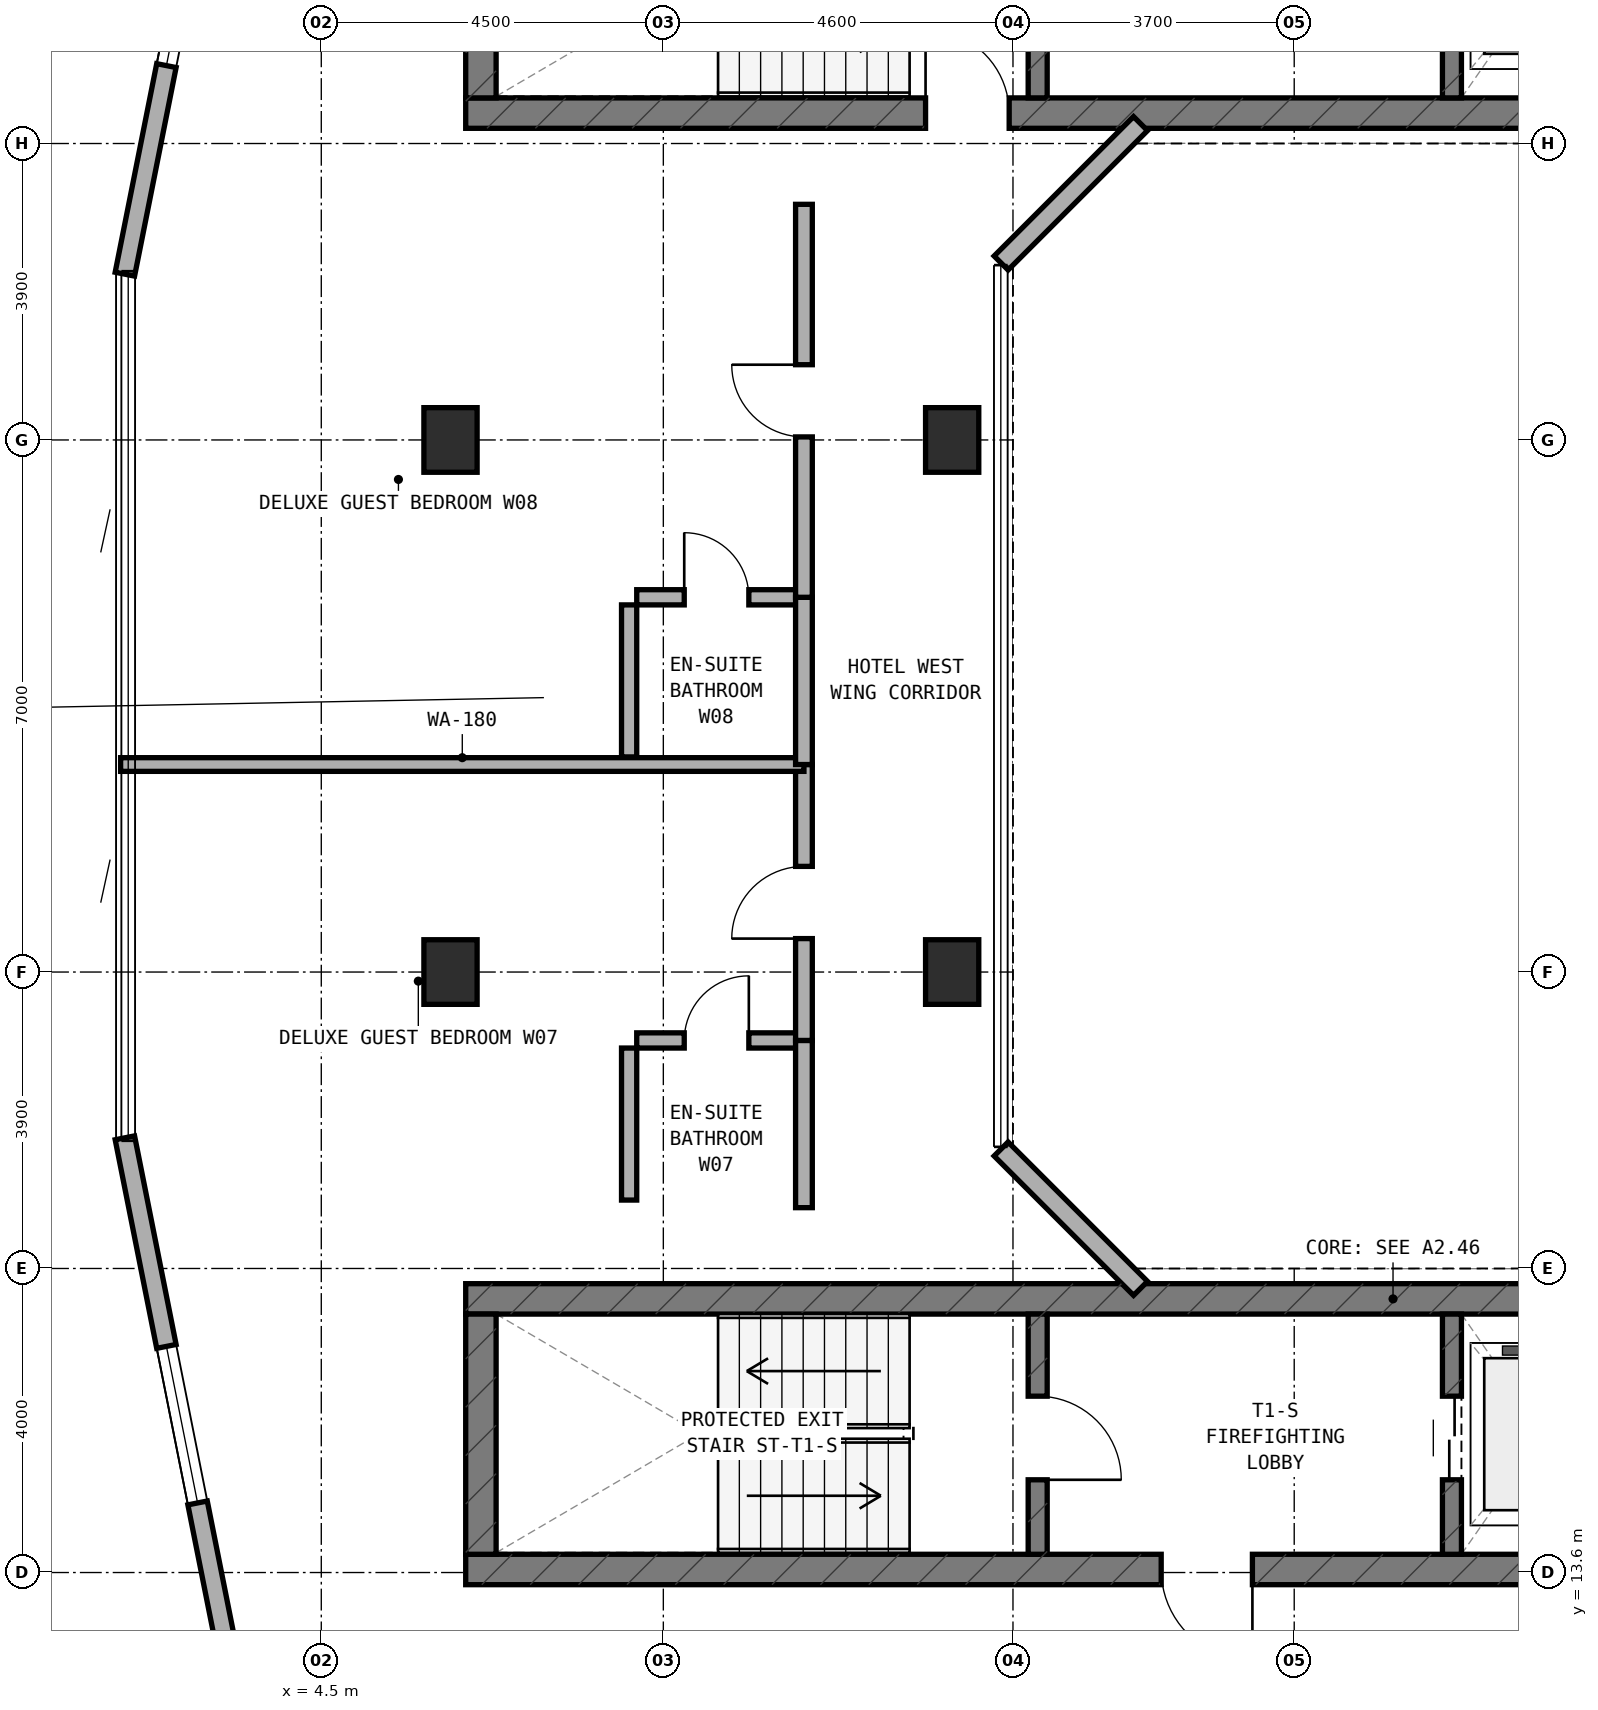
"""IFC4 building model, lengths in metres.
Left out: names, types, materials, properties, quantities, classifications, styles, units other than length and angle.
Written with IfcOpenShell. Run it as: python <this file> out.ifc"""

import sys

from ifc_helpers import new_model, si_unit, direction, frame, frame_2d, origin, origin_2d, place, context, subcontext, project, spatial, rectangle, extrude, element, fill, save


model = new_model("IFC4")
c1 = context("Model", 3, precision=1e-05, world=origin(), true_north=direction((0.0, 1.0)))
c2 = subcontext(c1, "Body", "Model", "MODEL_VIEW")
j1 = project(units=[si_unit("LENGTHUNIT", "METRE"), si_unit("PLANEANGLEUNIT", "RADIAN")], contexts=[c1])
p1 = place(None, origin())
s1 = spatial("IfcSite", under=j1, at=p1, CompositionType="ELEMENT")
p2 = place(p1, origin())
s2 = spatial("IfcBuilding", under=s1, at=p2, CompositionType="ELEMENT")
p3 = place(p2, frame((0.0, 0.0, 217.1)))
s3 = spatial("IfcBuildingStorey", under=s2, at=p3, CompositionType="ELEMENT", Elevation=217.1)
p4 = place(p3, frame((6.4, 32.8, 0.0), z_axis=(0.0, 0.0, 1.0), x_axis=(1.0, 0.0, 0.0)))
e1 = element("IfcWall", 1, at=p4, inside=s3, PredefinedType="SHEAR", context=c2, shape_type="SweptSolid", body=[
    extrude(rectangle(XDim=24.4, YDim=0.4, at=frame_2d((12.2, 0.0))), origin(), (0.0, 0.0, 1.0), 3.6),
])
p5 = place(p4, frame((6.05, 0.0, 0.0)))
e2 = element("IfcOpeningElement", 2, at=p5, cuts=e1, PredefinedType="OPENING", context=c2, shape_type="SweptSolid", body=[
    extrude(rectangle(XDim=1.1, YDim=2.15, at=frame_2d((0.55, 1.075))), frame((0.0, 0.21, 0.0), z_axis=(0.0, -1.0, 0.0), x_axis=(1.0, 0.0, 0.0)), (0.0, 0.0, 1.0), 0.42),
])
p6 = place(p3, frame((6.6, 33.0, 0.0), z_axis=(0.0, 0.0, 1.0), x_axis=(0.0, 1.0, 0.0)))
e3 = element("IfcWall", 3, at=p6, inside=s3, PredefinedType="SHEAR", context=c2, shape_type="SweptSolid", body=[
    extrude(rectangle(XDim=3.16, YDim=0.4, at=frame_2d((1.58, 0.0))), origin(), (0.0, 0.0, 1.0), 3.6),
])
p7 = place(p3, frame((13.925, 33.0, 0.0), z_axis=(0.0, 0.0, 1.0), x_axis=(0.0, 1.0, 0.0)))
e4 = element("IfcWall", 4, at=p7, inside=s3, PredefinedType="STANDARD", context=c2, shape_type="SweptSolid", body=[
    extrude(rectangle(XDim=3.16, YDim=0.25, at=frame_2d((1.58, 0.0))), origin(), (0.0, 0.0, 1.0), 3.32),
])
p8 = place(p7, frame((0.98, 0.0, 0.0)))
e5 = element("IfcOpeningElement", 5, at=p8, cuts=e4, PredefinedType="OPENING", context=c2, shape_type="SweptSolid", body=[
    extrude(rectangle(XDim=1.1, YDim=2.15, at=frame_2d((0.55, 1.075))), frame((0.0, 0.135, 0.0), z_axis=(0.0, -1.0, 0.0), x_axis=(1.0, 0.0, 0.0)), (0.0, 0.0, 1.0), 0.27),
])
p9 = place(p3, frame((19.375, 33.0, 0.0), z_axis=(0.0, 0.0, 1.0), x_axis=(0.0, 1.0, 0.0)))
e6 = element("IfcWall", 6, at=p9, inside=s3, PredefinedType="STANDARD", context=c2, shape_type="SweptSolid", body=[
    extrude(rectangle(XDim=3.16, YDim=0.25, at=frame_2d((1.58, 0.0))), origin(), (0.0, 0.0, 1.0), 3.32),
])
p10 = place(p9, frame((0.98, 0.0, 0.0)))
e7 = element("IfcOpeningElement", 7, at=p10, cuts=e6, PredefinedType="OPENING", context=c2, shape_type="SweptSolid", body=[
    extrude(rectangle(XDim=1.1, YDim=2.15, at=frame_2d((0.55, 1.075))), frame((0.0, 0.135, 0.0), z_axis=(0.0, -1.0, 0.0), x_axis=(1.0, 0.0, 0.0)), (0.0, 0.0, 1.0), 0.27),
])
p11 = place(p3, frame((6.4, 13.64, 0.0), z_axis=(0.0, 0.0, 1.0), x_axis=(1.0, 0.0, 0.0)))
e8 = element("IfcWall", 8, at=p11, inside=s3, PredefinedType="SHEAR", context=c2, shape_type="SweptSolid", body=[
    extrude(rectangle(XDim=24.4, YDim=0.4, at=frame_2d((12.2, 0.0))), origin(), (0.0, 0.0, 1.0), 3.6),
])
p12 = place(p11, frame((9.15, 0.0, 0.0)))
e9 = element("IfcOpeningElement", 9, at=p12, cuts=e8, PredefinedType="OPENING", context=c2, shape_type="SweptSolid", body=[
    extrude(rectangle(XDim=1.2, YDim=2.15, at=frame_2d((0.6, 1.075))), frame((0.0, 0.21, 0.0), z_axis=(0.0, -1.0, 0.0), x_axis=(1.0, 0.0, 0.0)), (0.0, 0.0, 1.0), 0.42),
])
p13 = place(p11, frame((16.94, 0.0, 0.0)))
e10 = element("IfcOpeningElement", 10, at=p13, cuts=e8, PredefinedType="OPENING", context=c2, shape_type="SweptSolid", body=[
    extrude(rectangle(XDim=0.85, YDim=2.1, at=frame_2d((0.425, 1.05))), frame((0.0, 0.21, 0.0), z_axis=(0.0, -1.0, 0.0), x_axis=(1.0, 0.0, 0.0)), (0.0, 0.0, 1.0), 0.42),
])
p14 = place(p11, frame((18.783, 0.0, 0.0)))
e11 = element("IfcOpeningElement", 11, at=p14, cuts=e8, PredefinedType="OPENING", context=c2, shape_type="SweptSolid", body=[
    extrude(rectangle(XDim=1.1, YDim=2.15, at=frame_2d((0.55, 1.075))), frame((0.0, 0.21, 0.0), z_axis=(0.0, -1.0, 0.0), x_axis=(1.0, 0.0, 0.0)), (0.0, 0.0, 1.0), 0.42),
])
p15 = place(p11, frame((20.65, 0.0, 0.0)))
e12 = element("IfcOpeningElement", 12, at=p15, cuts=e8, PredefinedType="OPENING", context=c2, shape_type="SweptSolid", body=[
    extrude(rectangle(XDim=1.1, YDim=2.15, at=frame_2d((0.55, 1.075))), frame((0.0, 0.21, 0.0), z_axis=(0.0, -1.0, 0.0), x_axis=(1.0, 0.0, 0.0)), (0.0, 0.0, 1.0), 0.42),
])
p16 = place(p11, frame((22.517, 0.0, 0.0)))
e13 = element("IfcOpeningElement", 13, at=p16, cuts=e8, PredefinedType="OPENING", context=c2, shape_type="SweptSolid", body=[
    extrude(rectangle(XDim=1.1, YDim=2.15, at=frame_2d((0.55, 1.075))), frame((0.0, 0.21, 0.0), z_axis=(0.0, -1.0, 0.0), x_axis=(1.0, 0.0, 0.0)), (0.0, 0.0, 1.0), 0.42),
])
p17 = place(p3, frame((6.4, 17.2, 0.0), z_axis=(0.0, 0.0, 1.0), x_axis=(1.0, 0.0, 0.0)))
e14 = element("IfcWall", 14, at=p17, inside=s3, PredefinedType="SHEAR", context=c2, shape_type="SweptSolid", body=[
    extrude(rectangle(XDim=24.4, YDim=0.4, at=frame_2d((12.2, 0.0))), origin(), (0.0, 0.0, 1.0), 3.6),
])
p18 = place(p3, frame((6.6, 13.84, 0.0), z_axis=(0.0, 0.0, 1.0), x_axis=(0.0, 1.0, 0.0)))
e15 = element("IfcWall", 15, at=p18, inside=s3, PredefinedType="SHEAR", context=c2, shape_type="SweptSolid", body=[
    extrude(rectangle(XDim=3.16, YDim=0.4, at=frame_2d((1.58, 0.0))), origin(), (0.0, 0.0, 1.0), 3.6),
])
p19 = place(p3, frame((13.925, 13.84, 0.0), z_axis=(0.0, 0.0, 1.0), x_axis=(0.0, 1.0, 0.0)))
e16 = element("IfcWall", 16, at=p19, inside=s3, PredefinedType="STANDARD", context=c2, shape_type="SweptSolid", body=[
    extrude(rectangle(XDim=3.16, YDim=0.25, at=frame_2d((1.58, 0.0))), origin(), (0.0, 0.0, 1.0), 3.32),
])
p20 = place(p19, frame((0.98, 0.0, 0.0)))
e17 = element("IfcOpeningElement", 17, at=p20, cuts=e16, PredefinedType="OPENING", context=c2, shape_type="SweptSolid", body=[
    extrude(rectangle(XDim=1.1, YDim=2.15, at=frame_2d((0.55, 1.075))), frame((0.0, 0.135, 0.0), z_axis=(0.0, -1.0, 0.0), x_axis=(1.0, 0.0, 0.0)), (0.0, 0.0, 1.0), 0.27),
])
p21 = place(p3, frame((19.375, 13.84, 0.0), z_axis=(0.0, 0.0, 1.0), x_axis=(0.0, 1.0, 0.0)))
e18 = element("IfcWall", 18, at=p21, inside=s3, PredefinedType="STANDARD", context=c2, shape_type="SweptSolid", body=[
    extrude(rectangle(XDim=3.16, YDim=0.25, at=frame_2d((1.58, 0.0))), origin(), (0.0, 0.0, 1.0), 3.32),
])
p22 = place(p21, frame((0.98, 0.0, 0.0)))
e19 = element("IfcOpeningElement", 19, at=p22, cuts=e18, PredefinedType="OPENING", context=c2, shape_type="SweptSolid", body=[
    extrude(rectangle(XDim=1.1, YDim=2.15, at=frame_2d((0.55, 1.075))), frame((0.0, 0.135, 0.0), z_axis=(0.0, -1.0, 0.0), x_axis=(1.0, 0.0, 0.0)), (0.0, 0.0, 1.0), 0.27),
])
for number, where, z_axis, x_axis in (
    (20, (6.2, 21.5, 0.0), (0.0, 0.0, 1.0), (1.0, 0.0, 0.0)),
    (21, (6.2, 28.5, 0.0), (0.0, 0.0, 1.0), (1.0, 0.0, 0.0)),
    (22, (12.8, 21.5, 0.0), (0.0, 0.0, 1.0), (1.0, 0.0, 0.0)),
    (23, (12.8, 28.5, 0.0), (0.0, 0.0, 1.0), (1.0, 0.0, 0.0)),
):
    element("IfcColumn", number, at=place(p3, frame(where, z_axis=z_axis, x_axis=x_axis)), inside=s3, PredefinedType="COLUMN", context=c2, shape_type="SweptSolid", body=[
        extrude(rectangle(XDim=0.7, YDim=0.85, at=origin_2d()), origin(), (0.0, 0.0, 1.0), 3.6),
    ])
p23 = place(p3, frame((3.629, 39.283, 0.0), z_axis=(0.0, 0.0, 1.0), x_axis=(-0.195291715883, -0.980745199176, 0.0)))
e24 = element("IfcWall", 24, at=p23, inside=s3, PredefinedType="STANDARD", context=c2, shape_type="SweptSolid", body=[
    extrude(rectangle(XDim=8.771, YDim=0.26, at=frame_2d((4.385, 0.0))), origin(), (0.0, 0.0, 1.0), 3.32),
])
p24 = place(p23, frame((3.873, 0.0, 0.85)))
e25 = element("IfcOpeningElement", 25, at=p24, cuts=e24, PredefinedType="OPENING", context=c2, shape_type="SweptSolid", body=[
    extrude(rectangle(XDim=2.1, YDim=1.5, at=frame_2d((1.05, 0.75))), frame((0.0, 0.14, 0.0), z_axis=(0.0, -1.0, 0.0), x_axis=(1.0, 0.0, 0.0)), (0.0, 0.0, 1.0), 0.28),
])
p25 = place(p3, frame((1.916, 19.319, 0.0), z_axis=(0.0, 0.0, 1.0), x_axis=(0.195291715883, -0.980745199176, 0.0)))
e26 = element("IfcWall", 26, at=p25, inside=s3, PredefinedType="STANDARD", context=c2, shape_type="SweptSolid", body=[
    extrude(rectangle(XDim=8.771, YDim=0.26, at=frame_2d((4.385, 0.0))), origin(), (0.0, 0.0, 1.0), 3.32),
])
p26 = place(p25, frame((2.798, 0.0, 0.85)))
e27 = element("IfcOpeningElement", 27, at=p26, cuts=e26, PredefinedType="OPENING", context=c2, shape_type="SweptSolid", body=[
    extrude(rectangle(XDim=2.1, YDim=1.5, at=frame_2d((1.05, 0.75))), frame((0.0, 0.14, 0.0), z_axis=(0.0, -1.0, 0.0), x_axis=(1.0, 0.0, 0.0)), (0.0, 0.0, 1.0), 0.28),
])
for number, where, z_axis, x_axis in (
    (28, (15.278, 32.662, 0.0), (0.0, 0.0, 1.0), (-0.707, -0.707, 0.0)),
    (29, (13.444, 19.172, 0.0), (0.0, 0.0, 1.0), (0.707, -0.707, 0.0)),
):
    element("IfcWall", number, at=place(p3, frame(where, z_axis=z_axis, x_axis=x_axis)), inside=s3, PredefinedType="STANDARD", context=c2, shape_type="SweptSolid", body=[
        extrude(rectangle(XDim=2.594, YDim=0.26, at=frame_2d((1.297, 0.0))), origin(), (0.0, 0.0, 1.0), 3.32),
    ])
p27 = place(p3, frame((8.65, 20.6, 0.0), z_axis=(0.0, 0.0, 1.0), x_axis=(1.0, 0.0, 0.0)))
e30 = element("IfcWall", 30, at=p27, inside=s3, PredefinedType="PLUMBINGWALL", context=c2, shape_type="SweptSolid", body=[
    extrude(rectangle(XDim=2.1, YDim=0.2, at=frame_2d((1.05, 0.0))), origin(), (0.0, 0.0, 1.0), 3.32),
])
p28 = place(p27, frame((0.625, 0.0, 0.0)))
e31 = element("IfcOpeningElement", 31, at=p28, cuts=e30, PredefinedType="OPENING", context=c2, shape_type="SweptSolid", body=[
    extrude(rectangle(XDim=0.85, YDim=2.1, at=frame_2d((0.425, 1.05))), frame((0.0, 0.11, 0.0), z_axis=(0.0, -1.0, 0.0), x_axis=(1.0, 0.0, 0.0)), (0.0, 0.0, 1.0), 0.22),
])
p29 = place(p3, frame((8.55, 18.5, 0.0), z_axis=(0.0, 0.0, 1.0), x_axis=(0.0, 1.0, 0.0)))
e32 = element("IfcWall", 32, at=p29, inside=s3, PredefinedType="PLUMBINGWALL", context=c2, shape_type="SweptSolid", body=[
    extrude(rectangle(XDim=2.0, YDim=0.2, at=frame_2d((1.0, 0.0))), origin(), (0.0, 0.0, 1.0), 3.32),
])
p30 = place(p3, frame((10.85, 18.4, 0.0), z_axis=(0.0, 0.0, 1.0), x_axis=(0.0, 1.0, 0.0)))
e33 = element("IfcWall", 33, at=p30, inside=s3, PredefinedType="SOLIDWALL", context=c2, shape_type="SweptSolid", body=[
    extrude(rectangle(XDim=2.2, YDim=0.22, at=frame_2d((1.1, 0.0))), origin(), (0.0, 0.0, 1.0), 3.32),
])
p31 = place(p3, frame((10.85, 20.6, 0.0), z_axis=(0.0, 0.0, 1.0), x_axis=(0.0, 1.0, 0.0)))
e34 = element("IfcWall", 34, at=p31, inside=s3, PredefinedType="SOLIDWALL", context=c2, shape_type="SweptSolid", body=[
    extrude(rectangle(XDim=3.63, YDim=0.22, at=frame_2d((1.815, 0.0))), origin(), (0.0, 0.0, 1.0), 2.695),
])
p32 = place(p31, frame((1.34, 0.0, 0.0)))
e35 = element("IfcOpeningElement", 35, at=p32, cuts=e34, PredefinedType="OPENING", context=c2, shape_type="SweptSolid", body=[
    extrude(rectangle(XDim=0.95, YDim=2.1, at=frame_2d((0.475, 1.05))), frame((0.0, 0.12, 0.0), z_axis=(0.0, -1.0, 0.0), x_axis=(1.0, 0.0, 0.0)), (0.0, 0.0, 1.0), 0.24),
])
p33 = place(p3, frame((1.86, 24.23, 0.0), z_axis=(0.0, 0.0, 1.0), x_axis=(1.0, 0.0, 0.0)))
e36 = element("IfcWall", 36, at=p33, inside=s3, PredefinedType="SOLIDWALL", context=c2, shape_type="SweptSolid", body=[
    extrude(rectangle(XDim=8.99, YDim=0.18, at=frame_2d((4.495, 0.0))), origin(), (0.0, 0.0, 1.0), 3.015),
])
p34 = place(p3, frame((8.65, 26.43, 0.0), z_axis=(0.0, 0.0, 1.0), x_axis=(1.0, 0.0, 0.0)))
e37 = element("IfcWall", 37, at=p34, inside=s3, PredefinedType="PLUMBINGWALL", context=c2, shape_type="SweptSolid", body=[
    extrude(rectangle(XDim=2.1, YDim=0.2, at=frame_2d((1.05, 0.0))), origin(), (0.0, 0.0, 1.0), 3.32),
])
p35 = place(p34, frame((0.625, 0.0, 0.0)))
e38 = element("IfcOpeningElement", 38, at=p35, cuts=e37, PredefinedType="OPENING", context=c2, shape_type="SweptSolid", body=[
    extrude(rectangle(XDim=0.85, YDim=2.1, at=frame_2d((0.425, 1.05))), frame((0.0, 0.11, 0.0), z_axis=(0.0, -1.0, 0.0), x_axis=(1.0, 0.0, 0.0)), (0.0, 0.0, 1.0), 0.22),
])
p36 = place(p3, frame((8.55, 24.33, 0.0), z_axis=(0.0, 0.0, 1.0), x_axis=(0.0, 1.0, 0.0)))
e39 = element("IfcWall", 39, at=p36, inside=s3, PredefinedType="PLUMBINGWALL", context=c2, shape_type="SweptSolid", body=[
    extrude(rectangle(XDim=2.0, YDim=0.2, at=frame_2d((1.0, 0.0))), origin(), (0.0, 0.0, 1.0), 3.32),
])
p37 = place(p3, frame((10.85, 24.23, 0.0), z_axis=(0.0, 0.0, 1.0), x_axis=(0.0, 1.0, 0.0)))
e40 = element("IfcWall", 40, at=p37, inside=s3, PredefinedType="SOLIDWALL", context=c2, shape_type="SweptSolid", body=[
    extrude(rectangle(XDim=2.2, YDim=0.22, at=frame_2d((1.1, 0.0))), origin(), (0.0, 0.0, 1.0), 3.32),
])
p38 = place(p3, frame((10.85, 26.43, 0.0), z_axis=(0.0, 0.0, 1.0), x_axis=(0.0, 1.0, 0.0)))
e41 = element("IfcWall", 41, at=p38, inside=s3, PredefinedType="SOLIDWALL", context=c2, shape_type="SweptSolid", body=[
    extrude(rectangle(XDim=5.17, YDim=0.22, at=frame_2d((2.585, 0.0))), origin(), (0.0, 0.0, 1.0), 2.695),
])
p39 = place(p38, frame((2.11, 0.0, 0.0)))
e42 = element("IfcOpeningElement", 42, at=p39, cuts=e41, PredefinedType="OPENING", context=c2, shape_type="SweptSolid", body=[
    extrude(rectangle(XDim=0.95, YDim=2.1, at=frame_2d((0.475, 1.05))), frame((0.0, 0.12, 0.0), z_axis=(0.0, -1.0, 0.0), x_axis=(1.0, 0.0, 0.0)), (0.0, 0.0, 1.0), 0.24),
])
p40 = place(p24, origin())
e43 = element("IfcWindow", 43, at=p40, inside=s3, PartitioningType="SINGLE_PANEL", PredefinedType="WINDOW", context=c2, shape_type="SweptSolid", body=[
    extrude(rectangle(XDim=2.1, YDim=1.5, at=frame_2d((1.05, 0.75))), frame((0.0, 0.03, 0.0), z_axis=(0.0, -1.0, 0.0), x_axis=(1.0, 0.0, 0.0)), (0.0, 0.0, 1.0), 0.06),
])
fill(e25, e43)
p41 = place(p26, origin())
e44 = element("IfcWindow", 44, at=p41, inside=s3, PartitioningType="SINGLE_PANEL", PredefinedType="WINDOW", context=c2, shape_type="SweptSolid", body=[
    extrude(rectangle(XDim=2.1, YDim=1.5, at=frame_2d((1.05, 0.75))), frame((0.0, 0.03, 0.0), z_axis=(0.0, -1.0, 0.0), x_axis=(1.0, 0.0, 0.0)), (0.0, 0.0, 1.0), 0.06),
])
fill(e27, e44)
p42 = place(p20, frame((1.1, 0.0, 0.0), z_axis=(0.0, 0.0, 1.0), x_axis=(-1.0, 0.0, 0.0)))
e45 = element("IfcDoor", 45, at=p42, inside=s3, OperationType="SINGLE_SWING_RIGHT", PredefinedType="DOOR", context=c2, shape_type="SweptSolid", body=[
    extrude(rectangle(XDim=1.1, YDim=2.15, at=frame_2d((0.55, 1.075))), frame((0.0, 0.025, 0.0), z_axis=(0.0, -1.0, 0.0), x_axis=(1.0, 0.0, 0.0)), (0.0, 0.0, 1.0), 0.05),
])
fill(e17, e45)
p43 = place(p12, frame((1.2, 0.0, 0.0), z_axis=(0.0, 0.0, 1.0), x_axis=(-1.0, 0.0, 0.0)))
e46 = element("IfcDoor", 46, at=p43, inside=s3, OperationType="SINGLE_SWING_LEFT", PredefinedType="DOOR", context=c2, shape_type="SweptSolid", body=[
    extrude(rectangle(XDim=1.2, YDim=2.15, at=frame_2d((0.6, 1.075))), frame((0.0, 0.025, 0.0), z_axis=(0.0, -1.0, 0.0), x_axis=(1.0, 0.0, 0.0)), (0.0, 0.0, 1.0), 0.05),
])
fill(e9, e46)
p44 = place(p22, origin())
e47 = element("IfcDoor", 47, at=p44, inside=s3, OperationType="DOUBLE_DOOR_SLIDING", PredefinedType="DOOR", context=c2, shape_type="SweptSolid", body=[
    extrude(rectangle(XDim=1.1, YDim=2.15, at=frame_2d((0.55, 1.075))), frame((0.0, 0.025, 0.0), z_axis=(0.0, -1.0, 0.0), x_axis=(1.0, 0.0, 0.0)), (0.0, 0.0, 1.0), 0.05),
])
fill(e19, e47)
p45 = place(p5, origin())
e48 = element("IfcDoor", 48, at=p45, inside=s3, OperationType="SINGLE_SWING_LEFT", PredefinedType="DOOR", context=c2, shape_type="SweptSolid", body=[
    extrude(rectangle(XDim=1.1, YDim=2.15, at=frame_2d((0.55, 1.075))), frame((0.0, 0.025, 0.0), z_axis=(0.0, -1.0, 0.0), x_axis=(1.0, 0.0, 0.0)), (0.0, 0.0, 1.0), 0.05),
])
fill(e2, e48)
p46 = place(p28, origin())
e49 = element("IfcDoor", 49, at=p46, inside=s3, OperationType="SINGLE_SWING_RIGHT", PredefinedType="DOOR", context=c2, shape_type="SweptSolid", body=[
    extrude(rectangle(XDim=0.85, YDim=2.1, at=frame_2d((0.425, 1.05))), frame((0.0, 0.025, 0.0), z_axis=(0.0, -1.0, 0.0), x_axis=(1.0, 0.0, 0.0)), (0.0, 0.0, 1.0), 0.05),
])
fill(e31, e49)
p47 = place(p32, origin())
e50 = element("IfcDoor", 50, at=p47, inside=s3, OperationType="SINGLE_SWING_LEFT", PredefinedType="DOOR", context=c2, shape_type="SweptSolid", body=[
    extrude(rectangle(XDim=0.95, YDim=2.1, at=frame_2d((0.475, 1.05))), frame((0.0, 0.025, 0.0), z_axis=(0.0, -1.0, 0.0), x_axis=(1.0, 0.0, 0.0)), (0.0, 0.0, 1.0), 0.05),
])
fill(e35, e50)
p48 = place(p35, origin())
e51 = element("IfcDoor", 51, at=p48, inside=s3, OperationType="SINGLE_SWING_LEFT", PredefinedType="DOOR", context=c2, shape_type="SweptSolid", body=[
    extrude(rectangle(XDim=0.85, YDim=2.1, at=frame_2d((0.425, 1.05))), frame((0.0, 0.025, 0.0), z_axis=(0.0, -1.0, 0.0), x_axis=(1.0, 0.0, 0.0)), (0.0, 0.0, 1.0), 0.05),
])
fill(e38, e51)
p49 = place(p39, origin())
e52 = element("IfcDoor", 52, at=p49, inside=s3, OperationType="SINGLE_SWING_RIGHT", PredefinedType="DOOR", context=c2, shape_type="SweptSolid", body=[
    extrude(rectangle(XDim=0.95, YDim=2.1, at=frame_2d((0.475, 1.05))), frame((0.0, 0.025, 0.0), z_axis=(0.0, -1.0, 0.0), x_axis=(1.0, 0.0, 0.0)), (0.0, 0.0, 1.0), 0.05),
])
fill(e42, e52)
save(model, sys.argv[1])
